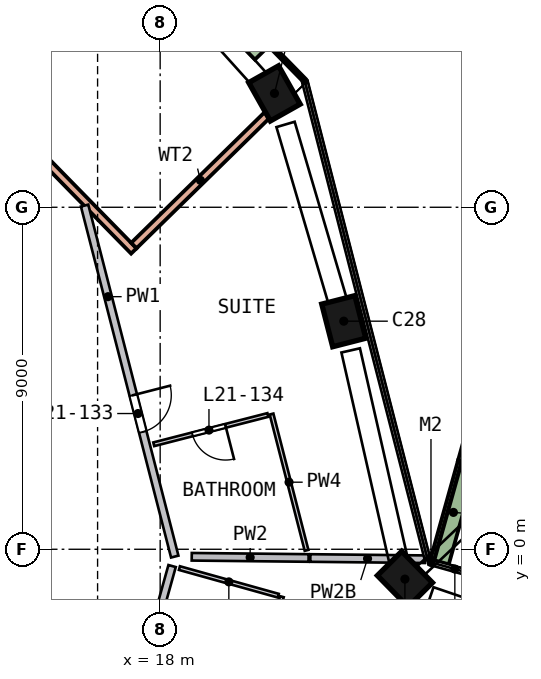
"""IFC4 building model, lengths in metres.
Left out: names, types, materials, properties, quantities, classifications, styles, units other than length and angle.
Written with IfcOpenShell. Run it as: python <this file> out.ifc"""

import sys

from ifc_helpers import new_model, si_unit, direction, frame, frame_2d, origin, origin_2d, place, context, subcontext, project, spatial, rectangle, extrude, element, fill, save


model = new_model("IFC4")
c1 = context("Model", 3, precision=1e-05, world=origin(), true_north=direction((0.0, 1.0)))
c2 = subcontext(c1, "Body", "Model", "MODEL_VIEW")
j1 = project(units=[si_unit("LENGTHUNIT", "METRE"), si_unit("PLANEANGLEUNIT", "RADIAN")], contexts=[c1])
p1 = place(None, origin())
s1 = spatial("IfcSite", under=j1, at=p1, CompositionType="ELEMENT")
p2 = place(p1, origin())
s2 = spatial("IfcBuilding", under=s1, at=p2, CompositionType="ELEMENT")
p3 = place(p2, frame((0.0, 0.0, 93.0)))
s3 = spatial("IfcBuildingStorey", under=s2, at=p3, CompositionType="ELEMENT", Elevation=93.0)
p4 = place(p3, frame((24.436, -0.926, 0.0), z_axis=(0.003420691, 0.116227489, 0.993216728), x_axis=(0.702265044, -0.707365794, 0.08035821)))
e1 = element("IfcColumn", 1, at=p4, inside=s3, PredefinedType="COLUMN", context=c2, shape_type="SweptSolid", body=[
    extrude(rectangle(XDim=1.15, YDim=0.9, at=origin_2d()), origin(), (0.0, 0.0, 1.0), 3.212),
])
p5 = place(p3, frame((22.867, 5.871, 0.0), z_axis=(-0.028823141, 0.108524069, 0.993675879), x_axis=(-0.246911463, 0.962510976, -0.112282459)))
e2 = element("IfcColumn", 2, at=p5, inside=s3, PredefinedType="COLUMN", context=c2, shape_type="SweptSolid", body=[
    extrude(rectangle(XDim=1.15, YDim=0.9, at=origin_2d()), origin(), (0.0, 0.0, 1.0), 3.21),
])
p6 = place(p3, frame((21.077, 11.876, 0.0), z_axis=(-0.057323866, 0.099746568, 0.993360255), x_axis=(0.487634582, -0.865435181, 0.115041132)))
e3 = element("IfcColumn", 3, at=p6, inside=s3, PredefinedType="COLUMN", context=c2, shape_type="SweptSolid", body=[
    extrude(rectangle(XDim=1.15, YDim=0.9, at=origin_2d()), origin(), (0.0, 0.0, 1.0), 3.211),
])
p7 = place(p3, frame((31.515, 1.012, 0.0), z_axis=(0.0, 0.0, 1.0), x_axis=(-0.963162724, 0.268919258, 0.0)))
e4 = element("IfcWall", 4, at=p7, inside=s3, PredefinedType="SOLIDWALL", context=c2, shape_type="SweptSolid", body=[
    extrude(rectangle(XDim=5.824, YDim=0.5, at=frame_2d((2.912, 0.0))), origin(), (0.0, 0.0, 1.0), 0.7),
])
p8 = place(p3, frame((26.08, 2.27, 0.0), z_axis=(0.0, 0.0, 1.0), x_axis=(-0.268921917, -0.963161982, 0.0)))
e5 = element("IfcWall", 5, at=p8, inside=s3, PredefinedType="SOLIDWALL", context=c2, shape_type="SweptSolid", body=[
    extrude(rectangle(XDim=2.699, YDim=0.5, at=frame_2d((1.35, 0.0))), origin(), (0.0, 0.0, 1.0), 0.7),
])
p9 = place(p3, frame((8.211, 17.139, 0.0), z_axis=(0.0, 0.0, 1.0), x_axis=(0.699668735, -0.714467397, 0.0)))
e6 = element("IfcWall", 6, at=p9, inside=s3, PredefinedType="SOLIDWALL", context=c2, shape_type="SweptSolid", body=[
    extrude(rectangle(XDim=13.0, YDim=0.2, at=frame_2d((6.5, 0.0))), origin(), (0.0, 0.0, 1.0), 3.19),
])
p10 = place(p9, frame((5.6, 0.0, 0.0)))
e7 = element("IfcOpeningElement", 7, at=p10, cuts=e6, PredefinedType="OPENING", context=c2, shape_type="SweptSolid", body=[
    extrude(rectangle(XDim=1.8, YDim=2.4, at=frame_2d((0.9, 1.2))), frame((0.0, 0.11, 0.0), z_axis=(0.0, -1.0, 0.0), x_axis=(1.0, 0.0, 0.0)), (0.0, 0.0, 1.0), 0.22),
])
p11 = place(p3, frame((20.812, 11.424, 0.0), z_axis=(0.0, 0.0, 1.0), x_axis=(-0.714460654, -0.69967562, 0.0)))
e8 = element("IfcWall", 8, at=p11, inside=s3, PredefinedType="SOLIDWALL", context=c2, shape_type="SweptSolid", body=[
    extrude(rectangle(XDim=4.904, YDim=0.2, at=frame_2d((2.452, 0.0))), origin(), (0.0, 0.0, 1.0), 3.19),
])
p12 = place(p3, frame((21.788, 12.351, 0.0), z_axis=(0.0, 0.0, 1.0), x_axis=(-0.699662003, 0.71447399, 0.0)))
e9 = element("IfcWall", 9, at=p12, inside=s3, PredefinedType="SOLIDWALL", context=c2, shape_type="SweptSolid", body=[
    extrude(rectangle(XDim=12.84, YDim=0.1, at=frame_2d((6.42, 0.0))), origin(), (0.0, 0.0, 1.0), 0.7),
])
p13 = place(p3, frame((20.673, 13.061, 0.0), z_axis=(0.0, 0.0, 1.0), x_axis=(-0.699645765, 0.71448989, 0.0)))
e10 = element("IfcWall", 10, at=p13, inside=s3, PredefinedType="SOLIDWALL", context=c2, shape_type="SweptSolid", body=[
    extrude(rectangle(XDim=4.457, YDim=0.5, at=frame_2d((2.229, 0.0))), origin(), (0.0, 0.0, 1.0), 0.7),
])
p14 = place(p3, frame((16.012, 9.044, 0.0), z_axis=(0.0, 0.0, 1.0), x_axis=(0.248687002, -0.968583902, 0.0)))
e11 = element("IfcWall", 11, at=p14, inside=s3, PredefinedType="SOLIDWALL", context=c2, shape_type="SweptSolid", body=[
    extrude(rectangle(XDim=9.536, YDim=0.2, at=frame_2d((4.768, 0.0))), origin(), (0.0, 0.0, 1.0), 3.19),
])
p15 = place(p14, frame((5.15, 0.0, 0.0)))
e12 = element("IfcOpeningElement", 12, at=p15, cuts=e11, PredefinedType="OPENING", context=c2, shape_type="SweptSolid", body=[
    extrude(rectangle(XDim=1.0, YDim=2.1, at=frame_2d((0.5, 1.05))), frame((0.0, 0.11, 0.0), z_axis=(0.0, -1.0, 0.0), x_axis=(1.0, 0.0, 0.0)), (0.0, 0.0, 1.0), 0.22),
])
p16 = place(p3, frame((17.4, -3.716, 0.0), z_axis=(0.0, 0.0, 1.0), x_axis=(0.26892136, 0.963162137, 0.0)))
e13 = element("IfcWall", 13, at=p16, inside=s3, PredefinedType="SOLIDWALL", context=c2, shape_type="SweptSolid", body=[
    extrude(rectangle(XDim=3.4, YDim=0.2, at=frame_2d((1.7, 0.0))), origin(), (0.0, 0.0, 1.0), 3.19),
])
p17 = place(p3, frame((18.831, -0.197, 0.0), z_axis=(0.0, 0.0, 1.0), x_axis=(0.999945068, -0.010481438, 0.0)))
e14 = element("IfcWall", 14, at=p17, inside=s3, PredefinedType="SOLIDWALL", context=c2, shape_type="SweptSolid", body=[
    extrude(rectangle(XDim=3.075, YDim=0.2, at=frame_2d((1.537, 0.0))), origin(), (0.0, 0.0, 1.0), 3.19),
])
p18 = place(p3, frame((21.951, -0.23, 0.0), z_axis=(0.0, 0.0, 1.0), x_axis=(0.99994531, -0.010458322, 0.0)))
e15 = element("IfcWall", 15, at=p18, inside=s3, PredefinedType="SOLIDWALL", context=c2, shape_type="SweptSolid", body=[
    extrude(rectangle(XDim=3.011, YDim=0.2, at=frame_2d((1.506, 0.0))), origin(), (0.0, 0.0, 1.0), 2.69),
])
p19 = place(p3, frame((20.834, 3.534, 0.0), z_axis=(0.0, 0.0, 1.0), x_axis=(-0.968580249, -0.24870123, 0.0)))
e16 = element("IfcWall", 16, at=p19, inside=s3, PredefinedType="PARTITIONING", context=c2, shape_type="SweptSolid", body=[
    extrude(rectangle(XDim=3.1, YDim=0.1, at=frame_2d((1.55, 0.0))), origin(), (0.0, 0.0, 1.0), 3.19),
])
p20 = place(p19, frame((1.15, 0.0, 0.0)))
e17 = element("IfcOpeningElement", 17, at=p20, cuts=e16, PredefinedType="OPENING", context=c2, shape_type="SweptSolid", body=[
    extrude(rectangle(XDim=0.9, YDim=2.1, at=frame_2d((0.45, 1.05))), frame((0.0, 0.06, 0.0), z_axis=(0.0, -1.0, 0.0), x_axis=(1.0, 0.0, 0.0)), (0.0, 0.0, 1.0), 0.12),
])
p21 = place(p3, frame((21.107, -1.221, 0.0), z_axis=(0.0, 0.0, 1.0), x_axis=(-0.963164718, 0.268912117, 0.0)))
e18 = element("IfcWall", 18, at=p21, inside=s3, PredefinedType="PARTITIONING", context=c2, shape_type="SweptSolid", body=[
    extrude(rectangle(XDim=2.7, YDim=0.1, at=frame_2d((1.35, 0.0))), origin(), (0.0, 0.0, 1.0), 3.19),
])
p22 = place(p3, frame((20.343, -4.33, 0.0), z_axis=(0.0, 0.0, 1.0), x_axis=(0.268942177, 0.963156324, 0.0)))
e19 = element("IfcWall", 19, at=p22, inside=s3, PredefinedType="PARTITIONING", context=c2, shape_type="SweptSolid", body=[
    extrude(rectangle(XDim=3.2, YDim=0.1, at=frame_2d((1.6, 0.0))), origin(), (0.0, 0.0, 1.0), 3.19),
])
p23 = place(p22, frame((1.05, 0.0, 0.0)))
e20 = element("IfcOpeningElement", 20, at=p23, cuts=e19, PredefinedType="OPENING", context=c2, shape_type="SweptSolid", body=[
    extrude(rectangle(XDim=0.9, YDim=2.1, at=frame_2d((0.45, 1.05))), frame((0.0, 0.06, 0.0), z_axis=(0.0, -1.0, 0.0), x_axis=(1.0, 0.0, 0.0)), (0.0, 0.0, 1.0), 0.12),
])
p24 = place(p3, frame((20.931, 3.559, 0.0), z_axis=(0.0, 0.0, 1.0), x_axis=(0.24868774, -0.968583712, 0.0)))
e21 = element("IfcWall", 21, at=p24, inside=s3, PredefinedType="PARTITIONING", context=c2, shape_type="SweptSolid", body=[
    extrude(rectangle(XDim=3.704, YDim=0.1, at=frame_2d((1.852, 0.0))), origin(), (0.0, 0.0, 1.0), 3.19),
])
p25 = place(p15, origin())
e22 = element("IfcDoor", 22, at=p25, inside=s3, OperationType="SINGLE_SWING_LEFT", PredefinedType="DOOR", context=c2, shape_type="SweptSolid", body=[
    extrude(rectangle(XDim=1.0, YDim=2.1, at=frame_2d((0.5, 1.05))), frame((0.0, 0.025, 0.0), z_axis=(0.0, -1.0, 0.0), x_axis=(1.0, 0.0, 0.0)), (0.0, 0.0, 1.0), 0.05),
])
fill(e12, e22)
p26 = place(p20, origin())
e23 = element("IfcDoor", 23, at=p26, inside=s3, OperationType="SINGLE_SWING_LEFT", PredefinedType="DOOR", context=c2, shape_type="SweptSolid", body=[
    extrude(rectangle(XDim=0.9, YDim=2.1, at=frame_2d((0.45, 1.05))), frame((0.0, 0.025, 0.0), z_axis=(0.0, -1.0, 0.0), x_axis=(1.0, 0.0, 0.0)), (0.0, 0.0, 1.0), 0.05),
])
fill(e17, e23)
save(model, sys.argv[1])
